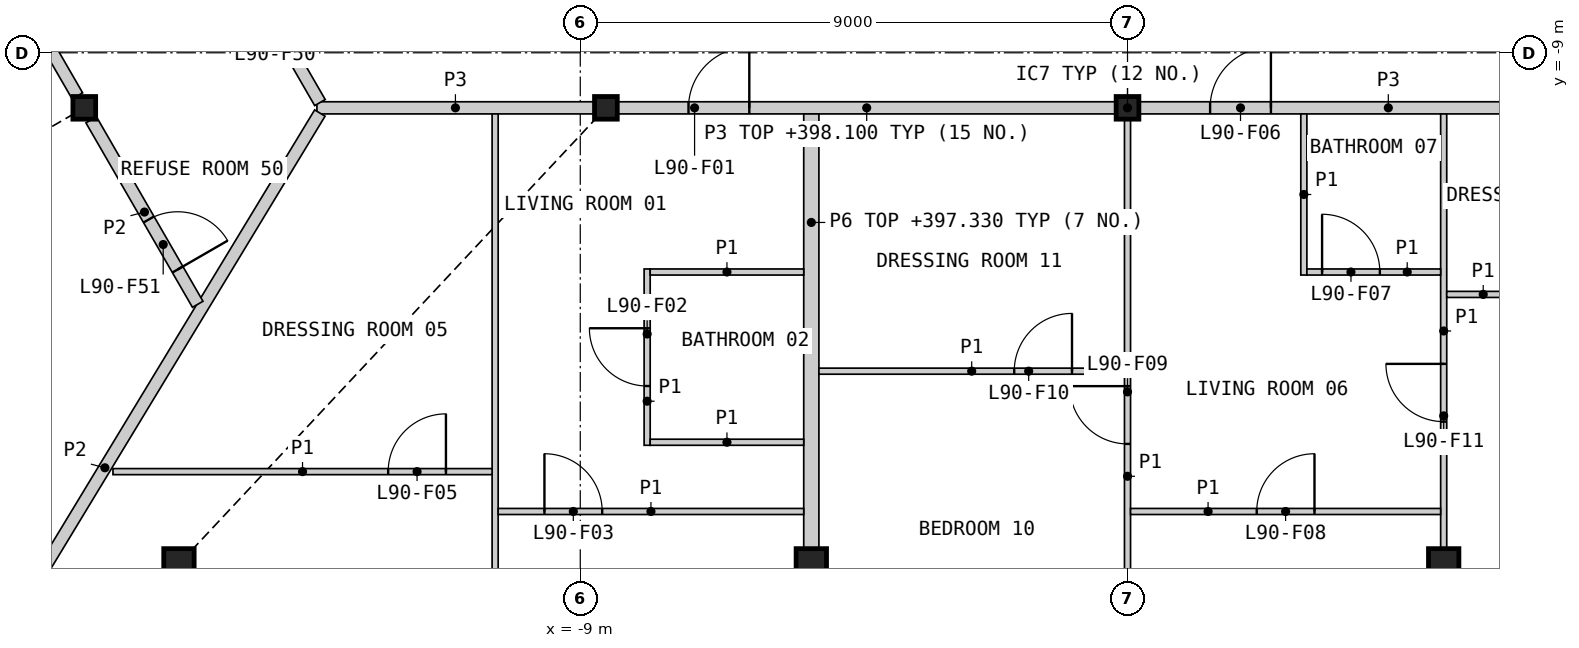
"""IFC4 building model, lengths in metres.
Left out: names, types, materials, properties, quantities, classifications, styles, units other than length and angle.
Written with IfcOpenShell. Run it as: python <this file> out.ifc"""

import sys

from ifc_helpers import new_model, si_unit, direction, frame, frame_2d, origin, origin_2d, place, context, subcontext, project, spatial, rectangle, hollow_rectangle, i_section, extrude, element, fill, save


model = new_model("IFC4")
c1 = context("Model", 3, precision=1e-05, world=origin(), true_north=direction((0.0, 1.0)))
c2 = subcontext(c1, "Body", "Model", "MODEL_VIEW")
j1 = project(units=[si_unit("LENGTHUNIT", "METRE"), si_unit("PLANEANGLEUNIT", "RADIAN")], contexts=[c1])
p1 = place(None, origin())
s1 = spatial("IfcSite", under=j1, at=p1, CompositionType="ELEMENT")
p2 = place(p1, origin())
s2 = spatial("IfcBuilding", under=s1, at=p2, CompositionType="ELEMENT")
p3 = place(p2, frame((0.0, 0.0, 395.0)))
s3 = spatial("IfcBuildingStorey", under=s2, at=p3, CompositionType="ELEMENT", Elevation=395.0)
for number, where, z_axis, x_axis in (
    (1, (-15.6, -17.406, 0.0), (0.0, 0.0, 1.0), (1.0, 0.0, 0.0)),
    (2, (-5.2, -17.406, 0.0), (0.0, 0.0, 1.0), (1.0, 0.0, 0.0)),
    (3, (5.2, -17.406, 0.0), (0.0, 0.0, 1.0), (1.0, 0.0, 0.0)),
):
    element("IfcColumn", number, at=place(p3, frame(where, z_axis=z_axis, x_axis=x_axis)), inside=s3, PredefinedType="COLUMN", context=c2, shape_type="SweptSolid", body=[
        extrude(hollow_rectangle(XDim=0.5, YDim=0.5, WallThickness=0.03, at=origin_2d()), origin(), (0.0, 0.0, 1.0), 3.4),
    ])
for number, where, z_axis, x_axis in (
    (4, (-17.157, -9.906, 0.0), (0.0, 0.0, 1.0), (1.0, 0.0, 0.0)),
    (5, (-8.578, -9.906, 0.0), (0.0, 0.0, 1.0), (1.0, 0.0, 0.0)),
    (6, (0.0, -9.906, 0.0), (0.0, 0.0, 1.0), (1.0, 0.0, 0.0)),
):
    element("IfcColumn", number, at=place(p3, frame(where, z_axis=z_axis, x_axis=x_axis)), inside=s3, PredefinedType="COLUMN", context=c2, shape_type="SweptSolid", body=[
        extrude(i_section(OverallWidth=0.374, OverallDepth=0.372, WebThickness=0.016, FlangeThickness=0.026, at=origin_2d()), origin(), (0.0, 0.0, 1.0), 3.4),
    ])
p4 = place(p3, frame((-8.382, -9.906, 0.0), z_axis=(0.0, 0.0, 1.0), x_axis=(1.0, 0.0, 0.0)))
e7 = element("IfcWall", 7, at=p4, inside=s3, PredefinedType="PARTITIONING", context=c2, shape_type="SweptSolid", body=[
    extrude(rectangle(XDim=8.185, YDim=0.2, at=frame_2d((4.092, 0.0))), origin(), (0.0, 0.0, 1.0), 3.1),
])
p5 = place(p4, frame((1.162, 0.0, 0.0)))
e8 = element("IfcOpeningElement", 8, at=p5, cuts=e7, PredefinedType="OPENING", context=c2, shape_type="SweptSolid", body=[
    extrude(rectangle(XDim=1.0, YDim=2.1, at=frame_2d((0.5, 1.05))), frame((0.0, 0.11, 0.0), z_axis=(0.0, -1.0, 0.0), x_axis=(1.0, 0.0, 0.0)), (0.0, 0.0, 1.0), 0.22),
])
p6 = place(p3, frame((0.197, -9.906, 0.0), z_axis=(0.0, 0.0, 1.0), x_axis=(1.0, 0.0, 0.0)))
e9 = element("IfcWall", 9, at=p6, inside=s3, PredefinedType="PARTITIONING", context=c2, shape_type="SweptSolid", body=[
    extrude(rectangle(XDim=8.185, YDim=0.2, at=frame_2d((4.092, 0.0))), origin(), (0.0, 0.0, 1.0), 3.1),
])
p7 = place(p6, frame((1.162, 0.0, 0.0)))
e10 = element("IfcOpeningElement", 10, at=p7, cuts=e9, PredefinedType="OPENING", context=c2, shape_type="SweptSolid", body=[
    extrude(rectangle(XDim=1.0, YDim=2.1, at=frame_2d((0.5, 1.05))), frame((0.0, 0.11, 0.0), z_axis=(0.0, -1.0, 0.0), x_axis=(1.0, 0.0, 0.0)), (0.0, 0.0, 1.0), 0.22),
])
p8 = place(p3, frame((-5.2, -17.146, 0.0), z_axis=(0.0, 0.0, 1.0), x_axis=(0.0, 1.0, 0.0)))
e11 = element("IfcWall", 11, at=p8, inside=s3, PredefinedType="PARTITIONING", context=c2, shape_type="SweptSolid", body=[
    extrude(rectangle(XDim=7.14, YDim=0.25, at=frame_2d((3.57, 0.0))), origin(), (0.0, 0.0, 1.0), 2.33),
])
p9 = place(p3, frame((-13.331, -9.906, 0.0), z_axis=(0.0, 0.0, 1.0), x_axis=(1.0, 0.0, 0.0)))
e12 = element("IfcWall", 12, at=p9, inside=s3, PredefinedType="PARTITIONING", context=c2, shape_type="SweptSolid", body=[
    extrude(rectangle(XDim=4.555, YDim=0.2, at=frame_2d((2.278, 0.0))), origin(), (0.0, 0.0, 1.0), 3.1),
])
p10 = place(p3, frame((-15.144, -6.592, 0.0), z_axis=(0.0, 0.0, 1.0), x_axis=(0.499958791762, -0.866049194065, 0.0)))
e13 = element("IfcWall", 13, at=p10, inside=s3, PredefinedType="PARTITIONING", context=c2, shape_type="SweptSolid", body=[
    extrude(rectangle(XDim=3.726, YDim=0.2, at=frame_2d((1.863, 0.0))), origin(), (0.0, 0.0, 1.0), 3.1),
])
p11 = place(p10, frame((1.388, 0.0, 0.0)))
e14 = element("IfcOpeningElement", 14, at=p11, cuts=e13, PredefinedType="OPENING", context=c2, shape_type="SweptSolid", body=[
    extrude(rectangle(XDim=0.95, YDim=2.1, at=frame_2d((0.475, 1.05))), frame((0.0, 0.11, 0.0), z_axis=(0.0, -1.0, 0.0), x_axis=(1.0, 0.0, 0.0)), (0.0, 0.0, 1.0), 0.22),
])
p12 = place(p3, frame((-20.354, -21.66, 0.0), z_axis=(0.0, 0.0, 1.0), x_axis=(0.518240642668, 0.85523484277, 0.0)))
e15 = element("IfcWall", 15, at=p12, inside=s3, PredefinedType="PARTITIONING", context=c2, shape_type="SweptSolid", body=[
    extrude(rectangle(XDim=13.644, YDim=0.2, at=frame_2d((6.822, 0.0))), origin(), (0.0, 0.0, 1.0), 2.33),
])
p13 = place(p3, frame((-17.043, -10.103, 0.0), z_axis=(0.0, 0.0, 1.0), x_axis=(0.500005931509, -0.866021979199, 0.0)))
e16 = element("IfcWall", 16, at=p13, inside=s3, PredefinedType="PARTITIONING", context=c2, shape_type="SweptSolid", body=[
    extrude(rectangle(XDim=3.504, YDim=0.2, at=frame_2d((1.752, 0.0))), origin(), (0.0, 0.0, 1.0), 2.33),
])
p14 = place(p13, frame((1.893, 0.0, 0.0)))
e17 = element("IfcOpeningElement", 17, at=p14, cuts=e16, PredefinedType="OPENING", context=c2, shape_type="SweptSolid", body=[
    extrude(rectangle(XDim=0.95, YDim=2.1, at=frame_2d((0.475, 1.05))), frame((0.0, 0.11, 0.0), z_axis=(0.0, -1.0, 0.0), x_axis=(1.0, 0.0, 0.0)), (0.0, 0.0, 1.0), 0.22),
])
p15 = place(p3, frame((-19.022, -6.674, 0.0), z_axis=(0.0, 0.0, 1.0), x_axis=(0.499983843005, -0.866034731829, 0.0)))
e18 = element("IfcWall", 18, at=p15, inside=s3, PredefinedType="PARTITIONING", context=c2, shape_type="SweptSolid", body=[
    extrude(rectangle(XDim=3.503, YDim=0.2, at=frame_2d((1.752, 0.0))), origin(), (0.0, 0.0, 1.0), 2.33),
])
p16 = place(p3, frame((-10.4, -21.828, 0.0), z_axis=(0.0, 0.0, 1.0), x_axis=(0.0, 1.0, 0.0)))
e19 = element("IfcWall", 19, at=p16, inside=s3, PredefinedType="PARTITIONING", context=c2, shape_type="SweptSolid", body=[
    extrude(rectangle(XDim=11.822, YDim=0.1, at=frame_2d((5.911, 0.0))), origin(), (0.0, 0.0, 1.0), 2.33),
])
p17 = place(p16, frame((1.358, 0.0, 0.0)))
e20 = element("IfcOpeningElement", 20, at=p17, cuts=e19, PredefinedType="OPENING", context=c2, shape_type="SweptSolid", body=[
    extrude(rectangle(XDim=0.95, YDim=2.1, at=frame_2d((0.475, 1.05))), frame((0.0, 0.06, 0.0), z_axis=(0.0, -1.0, 0.0), x_axis=(1.0, 0.0, 0.0)), (0.0, 0.0, 1.0), 0.12),
])
p18 = place(p3, frame((0.0, -21.828, 0.0), z_axis=(0.0, 0.0, 1.0), x_axis=(0.0, 1.0, 0.0)))
e21 = element("IfcWall", 21, at=p18, inside=s3, PredefinedType="PARTITIONING", context=c2, shape_type="SweptSolid", body=[
    extrude(rectangle(XDim=11.725, YDim=0.1, at=frame_2d((5.863, 0.0))), origin(), (0.0, 0.0, 1.0), 2.33),
])
p19 = place(p18, frame((6.395, 0.0, 0.0)))
e22 = element("IfcOpeningElement", 22, at=p19, cuts=e21, PredefinedType="OPENING", context=c2, shape_type="SweptSolid", body=[
    extrude(rectangle(XDim=0.95, YDim=2.1, at=frame_2d((0.475, 1.05))), frame((0.0, 0.06, 0.0), z_axis=(0.0, -1.0, 0.0), x_axis=(1.0, 0.0, 0.0)), (0.0, 0.0, 1.0), 0.12),
])
p20 = place(p3, frame((5.2, -17.146, 0.0), z_axis=(0.0, 0.0, 1.0), x_axis=(0.0, 1.0, 0.0)))
e23 = element("IfcWall", 23, at=p20, inside=s3, PredefinedType="PARTITIONING", context=c2, shape_type="SweptSolid", body=[
    extrude(rectangle(XDim=7.14, YDim=0.1, at=frame_2d((3.57, 0.0))), origin(), (0.0, 0.0, 1.0), 2.33),
])
p21 = place(p20, frame((2.079, 0.0, 0.0)))
e24 = element("IfcOpeningElement", 24, at=p21, cuts=e23, PredefinedType="OPENING", context=c2, shape_type="SweptSolid", body=[
    extrude(rectangle(XDim=0.95, YDim=2.1, at=frame_2d((0.475, 1.05))), frame((0.0, 0.06, 0.0), z_axis=(0.0, -1.0, 0.0), x_axis=(1.0, 0.0, 0.0)), (0.0, 0.0, 1.0), 0.12),
])
p22 = place(p3, frame((-16.685, -15.889, 0.0), z_axis=(0.0, 0.0, 1.0), x_axis=(1.0, 0.0, 0.0)))
e25 = element("IfcWall", 25, at=p22, inside=s3, PredefinedType="PARTITIONING", context=c2, shape_type="SweptSolid", body=[
    extrude(rectangle(XDim=6.235, YDim=0.1, at=frame_2d((3.118, 0.0))), origin(), (0.0, 0.0, 1.0), 2.33),
])
p23 = place(p22, frame((4.526, 0.0, 0.0)))
e26 = element("IfcOpeningElement", 26, at=p23, cuts=e25, PredefinedType="OPENING", context=c2, shape_type="SweptSolid", body=[
    extrude(rectangle(XDim=0.95, YDim=2.1, at=frame_2d((0.475, 1.05))), frame((0.0, 0.06, 0.0), z_axis=(0.0, -1.0, 0.0), x_axis=(1.0, 0.0, 0.0)), (0.0, 0.0, 1.0), 0.12),
])
p24 = place(p3, frame((-10.35, -16.544, 0.0), z_axis=(0.0, 0.0, 1.0), x_axis=(1.0, 0.0, 0.0)))
e27 = element("IfcWall", 27, at=p24, inside=s3, PredefinedType="PARTITIONING", context=c2, shape_type="SweptSolid", body=[
    extrude(rectangle(XDim=5.025, YDim=0.1, at=frame_2d((2.513, 0.0))), origin(), (0.0, 0.0, 1.0), 2.33),
])
p25 = place(p24, frame((0.761, 0.0, 0.0)))
e28 = element("IfcOpeningElement", 28, at=p25, cuts=e27, PredefinedType="OPENING", context=c2, shape_type="SweptSolid", body=[
    extrude(rectangle(XDim=0.95, YDim=2.1, at=frame_2d((0.475, 1.05))), frame((0.0, 0.06, 0.0), z_axis=(0.0, -1.0, 0.0), x_axis=(1.0, 0.0, 0.0)), (0.0, 0.0, 1.0), 0.12),
])
p26 = place(p3, frame((0.05, -16.544, 0.0), z_axis=(0.0, 0.0, 1.0), x_axis=(1.0, 0.0, 0.0)))
e29 = element("IfcWall", 29, at=p26, inside=s3, PredefinedType="PARTITIONING", context=c2, shape_type="SweptSolid", body=[
    extrude(rectangle(XDim=5.1, YDim=0.1, at=frame_2d((2.55, 0.0))), origin(), (0.0, 0.0, 1.0), 2.33),
])
p27 = place(p26, frame((2.075, 0.0, 0.0)))
e30 = element("IfcOpeningElement", 30, at=p27, cuts=e29, PredefinedType="OPENING", context=c2, shape_type="SweptSolid", body=[
    extrude(rectangle(XDim=0.95, YDim=2.1, at=frame_2d((0.475, 1.05))), frame((0.0, 0.06, 0.0), z_axis=(0.0, -1.0, 0.0), x_axis=(1.0, 0.0, 0.0)), (0.0, 0.0, 1.0), 0.12),
])
p28 = place(p3, frame((-5.075, -14.237, 0.0), z_axis=(0.0, 0.0, 1.0), x_axis=(1.0, 0.0, 0.0)))
e31 = element("IfcWall", 31, at=p28, inside=s3, PredefinedType="PARTITIONING", context=c2, shape_type="SweptSolid", body=[
    extrude(rectangle(XDim=5.025, YDim=0.1, at=frame_2d((2.512, 0.0))), origin(), (0.0, 0.0, 1.0), 2.33),
])
p29 = place(p28, frame((3.212, 0.0, 0.0)))
e32 = element("IfcOpeningElement", 32, at=p29, cuts=e31, PredefinedType="OPENING", context=c2, shape_type="SweptSolid", body=[
    extrude(rectangle(XDim=0.95, YDim=2.1, at=frame_2d((0.475, 1.05))), frame((0.0, 0.06, 0.0), z_axis=(0.0, -1.0, 0.0), x_axis=(1.0, 0.0, 0.0)), (0.0, 0.0, 1.0), 0.12),
])
p30 = place(p3, frame((-7.9, -15.456, 0.0), z_axis=(0.0, 0.0, 1.0), x_axis=(0.0, 1.0, 0.0)))
e33 = element("IfcWall", 33, at=p30, inside=s3, PredefinedType="PARTITIONING", context=c2, shape_type="SweptSolid", body=[
    extrude(rectangle(XDim=2.9, YDim=0.1, at=frame_2d((1.45, 0.0))), origin(), (0.0, 0.0, 1.0), 2.33),
])
p31 = place(p30, frame((0.975, 0.0, 0.0)))
e34 = element("IfcOpeningElement", 34, at=p31, cuts=e33, PredefinedType="OPENING", context=c2, shape_type="SweptSolid", body=[
    extrude(rectangle(XDim=0.95, YDim=2.1, at=frame_2d((0.475, 1.05))), frame((0.0, 0.06, 0.0), z_axis=(0.0, -1.0, 0.0), x_axis=(1.0, 0.0, 0.0)), (0.0, 0.0, 1.0), 0.12),
])
p32 = place(p3, frame((2.9, -12.656, 0.0), z_axis=(0.0, 0.0, 1.0), x_axis=(0.0, 1.0, 0.0)))
e35 = element("IfcWall", 35, at=p32, inside=s3, PredefinedType="PARTITIONING", context=c2, shape_type="SweptSolid", body=[
    extrude(rectangle(XDim=2.65, YDim=0.1, at=frame_2d((1.325, 0.0))), origin(), (0.0, 0.0, 1.0), 2.33),
])
for number, where, z_axis, x_axis in (
    (36, (-7.85, -12.606, 0.0), (0.0, 0.0, 1.0), (1.0, 0.0, 0.0)),
    (37, (-7.85, -15.406, 0.0), (0.0, 0.0, 1.0), (1.0, 0.0, 0.0)),
):
    element("IfcWall", number, at=place(p3, frame(where, z_axis=z_axis, x_axis=x_axis)), inside=s3, PredefinedType="PARTITIONING", context=c2, shape_type="SweptSolid", body=[
        extrude(rectangle(XDim=2.525, YDim=0.1, at=frame_2d((1.263, 0.0))), origin(), (0.0, 0.0, 1.0), 2.33),
    ])
p33 = place(p3, frame((5.25, -12.974, 0.0), z_axis=(0.0, 0.0, 1.0), x_axis=(1.0, 0.0, 0.0)))
e38 = element("IfcWall", 38, at=p33, inside=s3, PredefinedType="PARTITIONING", context=c2, shape_type="SweptSolid", body=[
    extrude(rectangle(XDim=2.4, YDim=0.1, at=frame_2d((1.2, 0.0))), origin(), (0.0, 0.0, 1.0), 2.33),
])
p34 = place(p33, frame((1.2, 0.0, 0.0)))
e39 = element("IfcOpeningElement", 39, at=p34, cuts=e38, PredefinedType="OPENING", context=c2, shape_type="SweptSolid", body=[
    extrude(rectangle(XDim=0.95, YDim=2.1, at=frame_2d((0.475, 1.05))), frame((0.0, 0.06, 0.0), z_axis=(0.0, -1.0, 0.0), x_axis=(1.0, 0.0, 0.0)), (0.0, 0.0, 1.0), 0.12),
])
p35 = place(p3, frame((2.95, -12.606, 0.0), z_axis=(0.0, 0.0, 1.0), x_axis=(1.0, 0.0, 0.0)))
e40 = element("IfcWall", 40, at=p35, inside=s3, PredefinedType="PARTITIONING", context=c2, shape_type="SweptSolid", body=[
    extrude(rectangle(XDim=2.2, YDim=0.1, at=frame_2d((1.1, 0.0))), origin(), (0.0, 0.0, 1.0), 2.33),
])
p36 = place(p35, frame((0.25, 0.0, 0.0)))
e41 = element("IfcOpeningElement", 41, at=p36, cuts=e40, PredefinedType="OPENING", context=c2, shape_type="SweptSolid", body=[
    extrude(rectangle(XDim=0.95, YDim=2.1, at=frame_2d((0.475, 1.05))), frame((0.0, 0.06, 0.0), z_axis=(0.0, -1.0, 0.0), x_axis=(1.0, 0.0, 0.0)), (0.0, 0.0, 1.0), 0.12),
])
p37 = place(p5, origin())
e42 = element("IfcDoor", 42, at=p37, inside=s3, OperationType="SINGLE_SWING_RIGHT", PredefinedType="DOOR", context=c2, shape_type="SweptSolid", body=[
    extrude(rectangle(XDim=1.0, YDim=2.1, at=frame_2d((0.5, 1.05))), frame((0.0, 0.025, 0.0), z_axis=(0.0, -1.0, 0.0), x_axis=(1.0, 0.0, 0.0)), (0.0, 0.0, 1.0), 0.05),
])
fill(e8, e42)
p38 = place(p31, origin())
e43 = element("IfcDoor", 43, at=p38, inside=s3, OperationType="SINGLE_SWING_RIGHT", PredefinedType="DOOR", context=c2, shape_type="SweptSolid", body=[
    extrude(rectangle(XDim=0.95, YDim=2.1, at=frame_2d((0.475, 1.05))), frame((0.0, 0.025, 0.0), z_axis=(0.0, -1.0, 0.0), x_axis=(1.0, 0.0, 0.0)), (0.0, 0.0, 1.0), 0.05),
])
fill(e34, e43)
p39 = place(p25, origin())
e44 = element("IfcDoor", 44, at=p39, inside=s3, OperationType="SINGLE_SWING_LEFT", PredefinedType="DOOR", context=c2, shape_type="SweptSolid", body=[
    extrude(rectangle(XDim=0.95, YDim=2.1, at=frame_2d((0.475, 1.05))), frame((0.0, 0.025, 0.0), z_axis=(0.0, -1.0, 0.0), x_axis=(1.0, 0.0, 0.0)), (0.0, 0.0, 1.0), 0.05),
])
fill(e28, e44)
p40 = place(p23, origin())
e45 = element("IfcDoor", 45, at=p40, inside=s3, OperationType="SINGLE_SWING_RIGHT", PredefinedType="DOOR", context=c2, shape_type="SweptSolid", body=[
    extrude(rectangle(XDim=0.95, YDim=2.1, at=frame_2d((0.475, 1.05))), frame((0.0, 0.025, 0.0), z_axis=(0.0, -1.0, 0.0), x_axis=(1.0, 0.0, 0.0)), (0.0, 0.0, 1.0), 0.05),
])
fill(e26, e45)
p41 = place(p7, origin())
e46 = element("IfcDoor", 46, at=p41, inside=s3, OperationType="SINGLE_SWING_RIGHT", PredefinedType="DOOR", context=c2, shape_type="SweptSolid", body=[
    extrude(rectangle(XDim=1.0, YDim=2.1, at=frame_2d((0.5, 1.05))), frame((0.0, 0.025, 0.0), z_axis=(0.0, -1.0, 0.0), x_axis=(1.0, 0.0, 0.0)), (0.0, 0.0, 1.0), 0.05),
])
fill(e10, e46)
p42 = place(p36, origin())
e47 = element("IfcDoor", 47, at=p42, inside=s3, OperationType="SINGLE_SWING_LEFT", PredefinedType="DOOR", context=c2, shape_type="SweptSolid", body=[
    extrude(rectangle(XDim=0.95, YDim=2.1, at=frame_2d((0.475, 1.05))), frame((0.0, 0.025, 0.0), z_axis=(0.0, -1.0, 0.0), x_axis=(1.0, 0.0, 0.0)), (0.0, 0.0, 1.0), 0.05),
])
fill(e41, e47)
p43 = place(p27, origin())
e48 = element("IfcDoor", 48, at=p43, inside=s3, OperationType="SINGLE_SWING_RIGHT", PredefinedType="DOOR", context=c2, shape_type="SweptSolid", body=[
    extrude(rectangle(XDim=0.95, YDim=2.1, at=frame_2d((0.475, 1.05))), frame((0.0, 0.025, 0.0), z_axis=(0.0, -1.0, 0.0), x_axis=(1.0, 0.0, 0.0)), (0.0, 0.0, 1.0), 0.05),
])
fill(e30, e48)
p44 = place(p19, origin())
e49 = element("IfcDoor", 49, at=p44, inside=s3, OperationType="SINGLE_SWING_RIGHT", PredefinedType="DOOR", context=c2, shape_type="SweptSolid", body=[
    extrude(rectangle(XDim=0.95, YDim=2.1, at=frame_2d((0.475, 1.05))), frame((0.0, 0.025, 0.0), z_axis=(0.0, -1.0, 0.0), x_axis=(1.0, 0.0, 0.0)), (0.0, 0.0, 1.0), 0.05),
])
fill(e22, e49)
p45 = place(p29, origin())
e50 = element("IfcDoor", 50, at=p45, inside=s3, OperationType="SINGLE_SWING_RIGHT", PredefinedType="DOOR", context=c2, shape_type="SweptSolid", body=[
    extrude(rectangle(XDim=0.95, YDim=2.1, at=frame_2d((0.475, 1.05))), frame((0.0, 0.025, 0.0), z_axis=(0.0, -1.0, 0.0), x_axis=(1.0, 0.0, 0.0)), (0.0, 0.0, 1.0), 0.05),
])
fill(e32, e50)
p46 = place(p21, origin())
e51 = element("IfcDoor", 51, at=p46, inside=s3, OperationType="SINGLE_SWING_RIGHT", PredefinedType="DOOR", context=c2, shape_type="SweptSolid", body=[
    extrude(rectangle(XDim=0.95, YDim=2.1, at=frame_2d((0.475, 1.05))), frame((0.0, 0.025, 0.0), z_axis=(0.0, -1.0, 0.0), x_axis=(1.0, 0.0, 0.0)), (0.0, 0.0, 1.0), 0.05),
])
fill(e24, e51)
p47 = place(p14, origin())
e52 = element("IfcDoor", 52, at=p47, inside=s3, OperationType="SINGLE_SWING_RIGHT", PredefinedType="DOOR", context=c2, shape_type="SweptSolid", body=[
    extrude(rectangle(XDim=0.95, YDim=2.1, at=frame_2d((0.475, 1.05))), frame((0.0, 0.025, 0.0), z_axis=(0.0, -1.0, 0.0), x_axis=(1.0, 0.0, 0.0)), (0.0, 0.0, 1.0), 0.05),
])
fill(e17, e52)
save(model, sys.argv[1])
